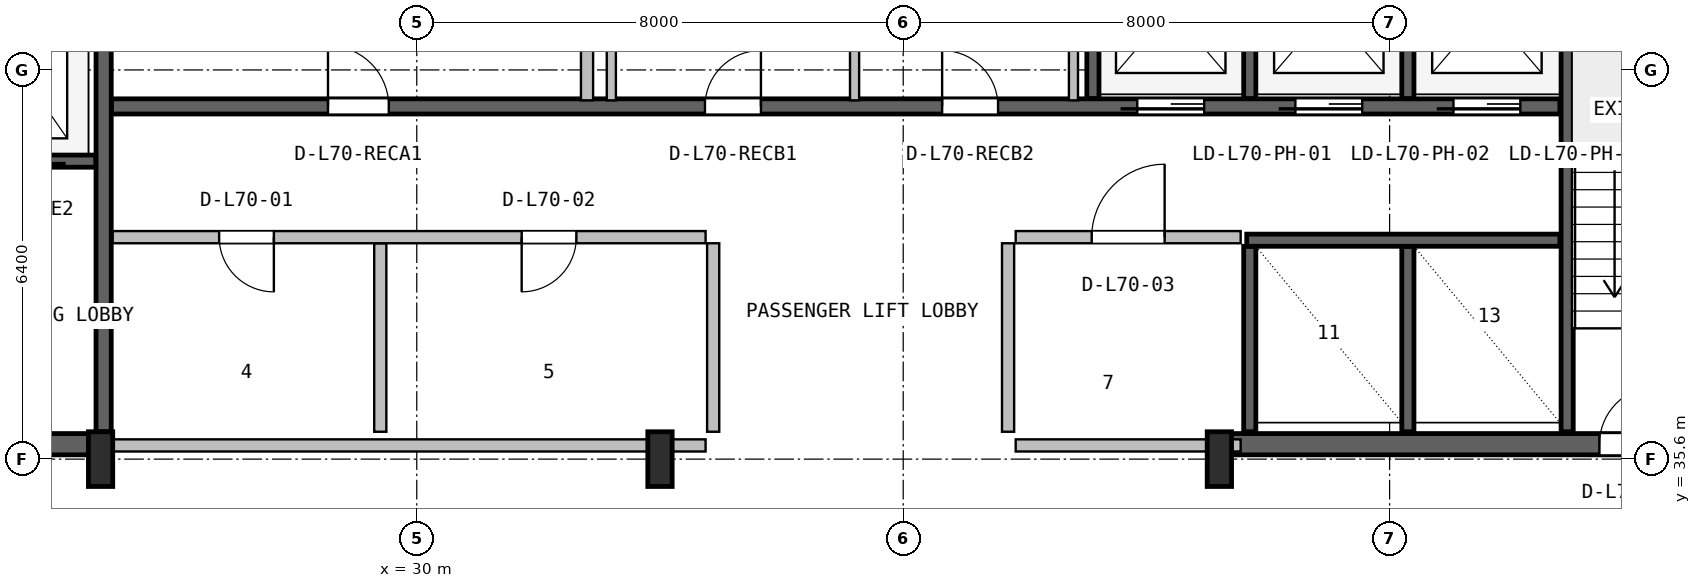
"""IFC4 building model, lengths in metres.
Left out: names, types, materials, properties, quantities, classifications, styles, units other than length and angle.
Written with IfcOpenShell. Run it as: python <this file> out.ifc"""

import sys

from ifc_helpers import new_model, si_unit, direction, frame, frame_2d, origin, origin_2d, place, context, subcontext, project, spatial, rectangle, i_section, extrude, source, transform, mapped, element, fill, save


model = new_model("IFC4")
c1 = context("Model", 3, precision=1e-05, world=origin(), true_north=direction((0.0, 1.0)))
c2 = subcontext(c1, "Body", "Model", "MODEL_VIEW")
j1 = project(units=[si_unit("LENGTHUNIT", "METRE"), si_unit("PLANEANGLEUNIT", "RADIAN")], contexts=[c1])
p1 = place(None, origin())
s1 = spatial("IfcSite", under=j1, at=p1, CompositionType="ELEMENT")
p2 = place(p1, origin())
s2 = spatial("IfcBuilding", under=s1, at=p2, CompositionType="ELEMENT")
p3 = place(p2, frame((0.0, 0.0, 281.2)))
s3 = spatial("IfcBuildingStorey", under=s2, at=p3, CompositionType="ELEMENT", Elevation=281.2)
p4 = place(p3, frame((15.67, 35.845, 0.0), z_axis=(0.0, 0.0, 1.0), x_axis=(1.0, 0.0, 0.0)))
e1 = element("IfcWall", 1, at=p4, inside=s3, PredefinedType="SHEAR", context=c2, shape_type="SweptSolid", body=[
    extrude(rectangle(XDim=9.13, YDim=0.35, at=frame_2d((4.565, 0.0))), origin(), (0.0, 0.0, 1.0), 3.55),
])
p5 = place(p4, frame((5.4, 0.0, 0.0)))
e2 = element("IfcOpeningElement", 2, at=p5, cuts=e1, PredefinedType="OPENING", context=c2, shape_type="SweptSolid", body=[
    extrude(rectangle(XDim=1.0, YDim=2.1, at=frame_2d((0.5, 1.05))), frame((0.0, 0.185, 0.0), z_axis=(0.0, -1.0, 0.0), x_axis=(1.0, 0.0, 0.0)), (0.0, 0.0, 1.0), 0.37),
])
p6 = place(p3, frame((43.2, 35.845, 0.0), z_axis=(0.0, 0.0, 1.0), x_axis=(1.0, 0.0, 0.0)))
e3 = element("IfcWall", 3, at=p6, inside=s3, PredefinedType="SHEAR", context=c2, shape_type="SweptSolid", body=[
    extrude(rectangle(XDim=9.13, YDim=0.35, at=frame_2d((4.565, 0.0))), origin(), (0.0, 0.0, 1.0), 3.55),
])
p7 = place(p6, frame((6.25, 0.0, 0.0)))
e4 = element("IfcOpeningElement", 4, at=p7, cuts=e3, PredefinedType="OPENING", context=c2, shape_type="SweptSolid", body=[
    extrude(rectangle(XDim=0.95, YDim=2.1, at=frame_2d((0.475, 1.05))), frame((0.0, 0.185, 0.0), z_axis=(0.0, -1.0, 0.0), x_axis=(1.0, 0.0, 0.0)), (0.0, 0.0, 1.0), 0.37),
])
m1 = source(origin(), c2, "Body", "SweptSolid", [
    extrude(i_section(OverallWidth=0.4, OverallDepth=0.9, WebThickness=0.016, FlangeThickness=0.028, FilletRadius=0.016, at=origin_2d()), origin(), (0.0, 0.0, 1.0), 3.8),
])
for number, where, z_axis, x_axis in (
    (5, (24.8, 35.6, 0.0), (0.0, 0.0, 1.0), (1.0, 0.0, 0.0)),
    (6, (34.0, 35.6, 0.0), (0.0, 0.0, 1.0), (1.0, 0.0, 0.0)),
    (7, (43.2, 35.6, 0.0), (0.0, 0.0, 1.0), (1.0, 0.0, 0.0)),
):
    element("IfcColumn", number, at=place(p3, frame(where, z_axis=z_axis, x_axis=x_axis)), inside=s3, PredefinedType="COLUMN", context=c2, shape_type="MappedRepresentation", body=[
        mapped(m1, transform((0.0, 0.0, 0.0), x_axis=(1.0, 0.0, 0.0), y_axis=(0.0, 1.0, 0.0), z_axis=(0.0, 0.0, 1.0), scale=1.0)),
    ])
p8 = place(p3, frame((24.85, 36.05, 0.0), z_axis=(0.0, 0.0, 1.0), x_axis=(0.0, 1.0, 0.0)))
e8 = element("IfcWall", 8, at=p8, inside=s3, PredefinedType="SHEAR", context=c2, shape_type="SweptSolid", body=[
    extrude(rectangle(XDim=10.45, YDim=0.25, at=frame_2d((5.225, 0.0))), origin(), (0.0, 0.0, 1.0), 3.55),
])
p9 = place(p3, frame((19.2, 40.5, 0.0), z_axis=(0.0, 0.0, 1.0), x_axis=(1.0, 0.0, 0.0)))
e9 = element("IfcWall", 9, at=p9, inside=s3, PredefinedType="SHEAR", context=c2, shape_type="SweptSolid", body=[
    extrude(rectangle(XDim=5.52, YDim=0.2, at=frame_2d((2.76, 0.0))), origin(), (0.0, 0.0, 1.0), 3.55),
])
p10 = place(p9, frame((1.05, 0.0, 0.0)))
e10 = element("IfcOpeningElement", 10, at=p10, cuts=e9, PredefinedType="OPENING", context=c2, shape_type="SweptSolid", body=[
    extrude(rectangle(XDim=1.1, YDim=2.18, at=frame_2d((0.55, 1.09))), frame((0.0, 0.11, 0.0), z_axis=(0.0, -1.0, 0.0), x_axis=(1.0, 0.0, 0.0)), (0.0, 0.0, 1.0), 0.22),
])
p11 = place(p9, frame((3.65, 0.0, 0.0)))
e11 = element("IfcOpeningElement", 11, at=p11, cuts=e9, PredefinedType="OPENING", context=c2, shape_type="SweptSolid", body=[
    extrude(rectangle(XDim=1.1, YDim=2.18, at=frame_2d((0.55, 1.09))), frame((0.0, 0.11, 0.0), z_axis=(0.0, -1.0, 0.0), x_axis=(1.0, 0.0, 0.0)), (0.0, 0.0, 1.0), 0.22),
])
p12 = place(p3, frame((48.92, 36.05, 0.0), z_axis=(0.0, 0.0, 1.0), x_axis=(0.0, 1.0, 0.0)))
e12 = element("IfcWall", 12, at=p12, inside=s3, PredefinedType="SHEAR", context=c2, shape_type="SweptSolid", body=[
    extrude(rectangle(XDim=10.5, YDim=0.2, at=frame_2d((5.25, 0.0))), origin(), (0.0, 0.0, 1.0), 3.55),
])
p13 = place(p3, frame((24.98, 41.4, 0.0), z_axis=(0.0, 0.0, 1.0), x_axis=(1.0, 0.0, 0.0)))
e13 = element("IfcWall", 13, at=p13, inside=s3, PredefinedType="SHEAR", context=c2, shape_type="SweptSolid", body=[
    extrude(rectangle(XDim=23.82, YDim=0.25, at=frame_2d((11.91, 0.0))), origin(), (0.0, 0.0, 1.0), 3.55),
])
p14 = place(p13, frame((16.87, 0.0, 0.0)))
e14 = element("IfcOpeningElement", 14, at=p14, cuts=e13, PredefinedType="OPENING", context=c2, shape_type="SweptSolid", body=[
    extrude(rectangle(XDim=1.1, YDim=2.18, at=frame_2d((0.55, 1.09))), frame((0.0, 0.135, 0.0), z_axis=(0.0, -1.0, 0.0), x_axis=(1.0, 0.0, 0.0)), (0.0, 0.0, 1.0), 0.27),
])
p15 = place(p13, frame((19.47, 0.0, 0.0)))
e15 = element("IfcOpeningElement", 15, at=p15, cuts=e13, PredefinedType="OPENING", context=c2, shape_type="SweptSolid", body=[
    extrude(rectangle(XDim=1.1, YDim=2.18, at=frame_2d((0.55, 1.09))), frame((0.0, 0.135, 0.0), z_axis=(0.0, -1.0, 0.0), x_axis=(1.0, 0.0, 0.0)), (0.0, 0.0, 1.0), 0.27),
])
p16 = place(p13, frame((22.07, 0.0, 0.0)))
e16 = element("IfcOpeningElement", 16, at=p16, cuts=e13, PredefinedType="OPENING", context=c2, shape_type="SweptSolid", body=[
    extrude(rectangle(XDim=1.1, YDim=2.18, at=frame_2d((0.55, 1.09))), frame((0.0, 0.135, 0.0), z_axis=(0.0, -1.0, 0.0), x_axis=(1.0, 0.0, 0.0)), (0.0, 0.0, 1.0), 0.27),
])
p17 = place(p13, frame((3.56, 0.0, 0.0)))
e17 = element("IfcOpeningElement", 17, at=p17, cuts=e13, PredefinedType="OPENING", context=c2, shape_type="SweptSolid", body=[
    extrude(rectangle(XDim=1.0, YDim=2.08, at=frame_2d((0.5, 1.04))), frame((0.0, 0.135, 0.0), z_axis=(0.0, -1.0, 0.0), x_axis=(1.0, 0.0, 0.0)), (0.0, 0.0, 1.0), 0.27),
])
p18 = place(p13, frame((9.76, 0.0, 0.0)))
e18 = element("IfcOpeningElement", 18, at=p18, cuts=e13, PredefinedType="OPENING", context=c2, shape_type="SweptSolid", body=[
    extrude(rectangle(XDim=0.92, YDim=2.08, at=frame_2d((0.46, 1.04))), frame((0.0, 0.135, 0.0), z_axis=(0.0, -1.0, 0.0), x_axis=(1.0, 0.0, 0.0)), (0.0, 0.0, 1.0), 0.27),
])
p19 = place(p13, frame((13.66, 0.0, 0.0)))
e19 = element("IfcOpeningElement", 19, at=p19, cuts=e13, PredefinedType="OPENING", context=c2, shape_type="SweptSolid", body=[
    extrude(rectangle(XDim=0.92, YDim=2.08, at=frame_2d((0.46, 1.04))), frame((0.0, 0.135, 0.0), z_axis=(0.0, -1.0, 0.0), x_axis=(1.0, 0.0, 0.0)), (0.0, 0.0, 1.0), 0.27),
])
p20 = place(p3, frame((41.12, 41.53, 0.0), z_axis=(0.0, 0.0, 1.0), x_axis=(0.0, 1.0, 0.0)))
e20 = element("IfcWall", 20, at=p20, inside=s3, PredefinedType="SHEAR", context=c2, shape_type="SweptSolid", body=[
    extrude(rectangle(XDim=5.02, YDim=0.2, at=frame_2d((2.51, 0.0))), origin(), (0.0, 0.0, 1.0), 3.55),
])
for number, where, z_axis, x_axis in (
    (21, (43.7, 41.53, 0.0), (0.0, 0.0, 1.0), (0.0, 1.0, 0.0)),
    (22, (46.3, 41.53, 0.0), (0.0, 0.0, 1.0), (0.0, 1.0, 0.0)),
):
    element("IfcWall", number, at=place(p3, frame(where, z_axis=z_axis, x_axis=x_axis)), inside=s3, PredefinedType="SHEAR", context=c2, shape_type="SweptSolid", body=[
        extrude(rectangle(XDim=2.87, YDim=0.2, at=frame_2d((1.435, 0.0))), origin(), (0.0, 0.0, 1.0), 3.55),
    ])
for number, where, z_axis, x_axis in (
    (23, (43.7, 36.05, 0.0), (0.0, 0.0, 1.0), (0.0, 1.0, 0.0)),
    (24, (46.3, 36.05, 0.0), (0.0, 0.0, 1.0), (0.0, 1.0, 0.0)),
):
    element("IfcWall", number, at=place(p3, frame(where, z_axis=z_axis, x_axis=x_axis)), inside=s3, PredefinedType="SHEAR", context=c2, shape_type="SweptSolid", body=[
        extrude(rectangle(XDim=3.05, YDim=0.2, at=frame_2d((1.525, 0.0))), origin(), (0.0, 0.0, 1.0), 3.55),
    ])
p21 = place(p3, frame((43.65, 39.2, 0.0), z_axis=(0.0, 0.0, 1.0), x_axis=(1.0, 0.0, 0.0)))
e25 = element("IfcWall", 25, at=p21, inside=s3, PredefinedType="SHEAR", context=c2, shape_type="SweptSolid", body=[
    extrude(rectangle(XDim=5.15, YDim=0.2, at=frame_2d((2.575, 0.0))), origin(), (0.0, 0.0, 1.0), 3.55),
])
p22 = place(p3, frame((25.0, 35.825, 0.0), z_axis=(0.0, 0.0, 1.0), x_axis=(1.0, 0.0, 0.0)))
e26 = element("IfcWall", 26, at=p22, inside=s3, PredefinedType="PLUMBINGWALL", context=c2, shape_type="SweptSolid", body=[
    extrude(rectangle(XDim=9.75, YDim=0.2, at=frame_2d((4.875, 0.0))), origin(), (0.0, 0.0, 1.0), 2.575),
])
p23 = place(p3, frame((29.4, 36.05, 0.0), z_axis=(0.0, 0.0, 1.0), x_axis=(0.0, 1.0, 0.0)))
e27 = element("IfcWall", 27, at=p23, inside=s3, PredefinedType="PLUMBINGWALL", context=c2, shape_type="SweptSolid", body=[
    extrude(rectangle(XDim=3.1, YDim=0.2, at=frame_2d((1.55, 0.0))), origin(), (0.0, 0.0, 1.0), 3.53),
])
p24 = place(p3, frame((25.0, 39.25, 0.0), z_axis=(0.0, 0.0, 1.0), x_axis=(1.0, 0.0, 0.0)))
e28 = element("IfcWall", 28, at=p24, inside=s3, PredefinedType="PLUMBINGWALL", context=c2, shape_type="SweptSolid", body=[
    extrude(rectangle(XDim=9.75, YDim=0.2, at=frame_2d((4.875, 0.0))), origin(), (0.0, 0.0, 1.0), 3.53),
])
p25 = place(p24, frame((1.75, 0.0, 0.0)))
e29 = element("IfcOpeningElement", 29, at=p25, cuts=e28, PredefinedType="OPENING", context=c2, shape_type="SweptSolid", body=[
    extrude(rectangle(XDim=0.9, YDim=2.06, at=frame_2d((0.45, 1.03))), frame((0.0, 0.11, 0.0), z_axis=(0.0, -1.0, 0.0), x_axis=(1.0, 0.0, 0.0)), (0.0, 0.0, 1.0), 0.22),
])
p26 = place(p24, frame((6.725, 0.0, 0.0)))
e30 = element("IfcOpeningElement", 30, at=p26, cuts=e28, PredefinedType="OPENING", context=c2, shape_type="SweptSolid", body=[
    extrude(rectangle(XDim=0.9, YDim=2.06, at=frame_2d((0.45, 1.03))), frame((0.0, 0.11, 0.0), z_axis=(0.0, -1.0, 0.0), x_axis=(1.0, 0.0, 0.0)), (0.0, 0.0, 1.0), 0.22),
])
p27 = place(p3, frame((34.875, 36.05, 0.0), z_axis=(0.0, 0.0, 1.0), x_axis=(0.0, 1.0, 0.0)))
e31 = element("IfcWall", 31, at=p27, inside=s3, PredefinedType="PLUMBINGWALL", context=c2, shape_type="SweptSolid", body=[
    extrude(rectangle(XDim=3.1, YDim=0.2, at=frame_2d((1.55, 0.0))), origin(), (0.0, 0.0, 1.0), 3.53),
])
p28 = place(p3, frame((39.85, 35.825, 0.0), z_axis=(0.0, 0.0, 1.0), x_axis=(1.0, 0.0, 0.0)))
e32 = element("IfcWall", 32, at=p28, inside=s3, PredefinedType="SOLIDWALL", context=c2, shape_type="SweptSolid", body=[
    extrude(rectangle(XDim=3.7, YDim=0.2, at=frame_2d((1.85, 0.0))), origin(), (0.0, 0.0, 1.0), 2.575),
])
p29 = place(p3, frame((39.85, 39.25, 0.0), z_axis=(0.0, 0.0, 1.0), x_axis=(1.0, 0.0, 0.0)))
e33 = element("IfcWall", 33, at=p29, inside=s3, PredefinedType="SOLIDWALL", context=c2, shape_type="SweptSolid", body=[
    extrude(rectangle(XDim=3.7, YDim=0.2, at=frame_2d((1.85, 0.0))), origin(), (0.0, 0.0, 1.0), 3.53),
])
p30 = place(p29, frame((1.25, 0.0, 0.0)))
e34 = element("IfcOpeningElement", 34, at=p30, cuts=e33, PredefinedType="OPENING", context=c2, shape_type="SweptSolid", body=[
    extrude(rectangle(XDim=1.2, YDim=2.1, at=frame_2d((0.6, 1.05))), frame((0.0, 0.11, 0.0), z_axis=(0.0, -1.0, 0.0), x_axis=(1.0, 0.0, 0.0)), (0.0, 0.0, 1.0), 0.22),
])
p31 = place(p3, frame((39.725, 36.05, 0.0), z_axis=(0.0, 0.0, 1.0), x_axis=(0.0, 1.0, 0.0)))
e35 = element("IfcWall", 35, at=p31, inside=s3, PredefinedType="SOLIDWALL", context=c2, shape_type="SweptSolid", body=[
    extrude(rectangle(XDim=3.1, YDim=0.2, at=frame_2d((1.55, 0.0))), origin(), (0.0, 0.0, 1.0), 3.53),
])
p32 = place(p3, frame((32.8, 41.5, 0.0), z_axis=(0.0, 0.0, 1.0), x_axis=(0.0, 1.0, 0.0)))
e36 = element("IfcWall", 36, at=p32, inside=s3, PredefinedType="SOLIDWALL", context=c2, shape_type="SweptSolid", body=[
    extrude(rectangle(XDim=5.02, YDim=0.2, at=frame_2d((2.51, 0.0))), origin(), (0.0, 0.0, 1.0), 3.53),
])
p33 = place(p3, frame((37.2, 41.5, 0.0), z_axis=(0.0, 0.0, 1.0), x_axis=(0.0, 1.0, 0.0)))
e37 = element("IfcWall", 37, at=p33, inside=s3, PredefinedType="PARTITIONING", context=c2, shape_type="SweptSolid", body=[
    extrude(rectangle(XDim=2.325, YDim=0.15, at=frame_2d((1.163, 0.0))), origin(), (0.0, 0.0, 1.0), 3.53),
])
for number, where, z_axis, x_axis in (
    (38, (40.8, 41.5, 0.0), (0.0, 0.0, 1.0), (0.0, 1.0, 0.0)),
    (39, (33.2, 41.5, 0.0), (0.0, 0.0, 1.0), (0.0, 1.0, 0.0)),
):
    element("IfcWall", number, at=place(p3, frame(where, z_axis=z_axis, x_axis=x_axis)), inside=s3, PredefinedType="PARTITIONING", context=c2, shape_type="SweptSolid", body=[
        extrude(rectangle(XDim=5.02, YDim=0.15, at=frame_2d((2.51, 0.0))), origin(), (0.0, 0.0, 1.0), 3.53),
    ])
m2 = source(origin(), c2, "Body", "SweptSolid", [
    extrude(rectangle(XDim=0.95, YDim=2.1, at=frame_2d((0.475, 1.05))), frame((0.0, 0.025, 0.0), z_axis=(0.0, -1.0, 0.0), x_axis=(1.0, 0.0, 0.0)), (0.0, 0.0, 1.0), 0.05),
])
p34 = place(p7, origin())
e40 = element("IfcDoor", 40, at=p34, inside=s3, OperationType="SINGLE_SWING_RIGHT", PredefinedType="DOOR", context=c2, shape_type="MappedRepresentation", body=[
    mapped(m2, transform((0.0, 0.0, 0.0), x_axis=(1.0, 0.0, 0.0), y_axis=(0.0, 1.0, 0.0), z_axis=(0.0, 0.0, 1.0), scale=1.0)),
])
fill(e4, e40)
m3 = source(origin(), c2, "Body", "SweptSolid", [
    extrude(rectangle(XDim=1.1, YDim=2.18, at=frame_2d((0.55, 1.09))), frame((0.0, 0.025, 0.0), z_axis=(0.0, -1.0, 0.0), x_axis=(1.0, 0.0, 0.0)), (0.0, 0.0, 1.0), 0.05),
])
p35 = place(p14, frame((1.1, 0.0, 0.0), z_axis=(0.0, 0.0, 1.0), x_axis=(-1.0, 0.0, 0.0)))
e41 = element("IfcDoor", 41, at=p35, inside=s3, OperationType="SLIDING_TO_LEFT", PredefinedType="DOOR", context=c2, shape_type="MappedRepresentation", body=[
    mapped(m3, transform((0.0, 0.0, 0.0), x_axis=(1.0, 0.0, 0.0), y_axis=(0.0, 1.0, 0.0), z_axis=(0.0, 0.0, 1.0), scale=1.0)),
])
fill(e14, e41)
p36 = place(p15, frame((1.1, 0.0, 0.0), z_axis=(0.0, 0.0, 1.0), x_axis=(-1.0, 0.0, 0.0)))
e42 = element("IfcDoor", 42, at=p36, inside=s3, OperationType="SLIDING_TO_LEFT", PredefinedType="DOOR", context=c2, shape_type="MappedRepresentation", body=[
    mapped(m3, transform((0.0, 0.0, 0.0), x_axis=(1.0, 0.0, 0.0), y_axis=(0.0, 1.0, 0.0), z_axis=(0.0, 0.0, 1.0), scale=1.0)),
])
fill(e15, e42)
p37 = place(p16, frame((1.1, 0.0, 0.0), z_axis=(0.0, 0.0, 1.0), x_axis=(-1.0, 0.0, 0.0)))
e43 = element("IfcDoor", 43, at=p37, inside=s3, OperationType="SLIDING_TO_LEFT", PredefinedType="DOOR", context=c2, shape_type="MappedRepresentation", body=[
    mapped(m3, transform((0.0, 0.0, 0.0), x_axis=(1.0, 0.0, 0.0), y_axis=(0.0, 1.0, 0.0), z_axis=(0.0, 0.0, 1.0), scale=1.0)),
])
fill(e16, e43)
m4 = source(origin(), c2, "Body", "SweptSolid", [
    extrude(rectangle(XDim=1.0, YDim=2.08, at=frame_2d((0.5, 1.04))), frame((0.0, 0.025, 0.0), z_axis=(0.0, -1.0, 0.0), x_axis=(1.0, 0.0, 0.0)), (0.0, 0.0, 1.0), 0.05),
])
p38 = place(p17, origin())
e44 = element("IfcDoor", 44, at=p38, inside=s3, OperationType="SINGLE_SWING_LEFT", PredefinedType="DOOR", context=c2, shape_type="MappedRepresentation", body=[
    mapped(m4, transform((0.0, 0.0, 0.0), x_axis=(1.0, 0.0, 0.0), y_axis=(0.0, 1.0, 0.0), z_axis=(0.0, 0.0, 1.0), scale=1.0)),
])
fill(e17, e44)
m5 = source(origin(), c2, "Body", "SweptSolid", [
    extrude(rectangle(XDim=0.92, YDim=2.08, at=frame_2d((0.46, 1.04))), frame((0.0, 0.025, 0.0), z_axis=(0.0, -1.0, 0.0), x_axis=(1.0, 0.0, 0.0)), (0.0, 0.0, 1.0), 0.05),
])
p39 = place(p18, origin())
e45 = element("IfcDoor", 45, at=p39, inside=s3, OperationType="SINGLE_SWING_RIGHT", PredefinedType="DOOR", context=c2, shape_type="MappedRepresentation", body=[
    mapped(m5, transform((0.0, 0.0, 0.0), x_axis=(1.0, 0.0, 0.0), y_axis=(0.0, 1.0, 0.0), z_axis=(0.0, 0.0, 1.0), scale=1.0)),
])
fill(e18, e45)
p40 = place(p19, origin())
e46 = element("IfcDoor", 46, at=p40, inside=s3, OperationType="SINGLE_SWING_LEFT", PredefinedType="DOOR", context=c2, shape_type="MappedRepresentation", body=[
    mapped(m5, transform((0.0, 0.0, 0.0), x_axis=(1.0, 0.0, 0.0), y_axis=(0.0, 1.0, 0.0), z_axis=(0.0, 0.0, 1.0), scale=1.0)),
])
fill(e19, e46)
m6 = source(origin(), c2, "Body", "SweptSolid", [
    extrude(rectangle(XDim=0.9, YDim=2.06, at=frame_2d((0.45, 1.03))), frame((0.0, 0.025, 0.0), z_axis=(0.0, -1.0, 0.0), x_axis=(1.0, 0.0, 0.0)), (0.0, 0.0, 1.0), 0.05),
])
p41 = place(p25, frame((0.9, 0.0, 0.0), z_axis=(0.0, 0.0, 1.0), x_axis=(-1.0, 0.0, 0.0)))
e47 = element("IfcDoor", 47, at=p41, inside=s3, OperationType="SINGLE_SWING_RIGHT", PredefinedType="DOOR", context=c2, shape_type="MappedRepresentation", body=[
    mapped(m6, transform((0.0, 0.0, 0.0), x_axis=(1.0, 0.0, 0.0), y_axis=(0.0, 1.0, 0.0), z_axis=(0.0, 0.0, 1.0), scale=1.0)),
])
fill(e29, e47)
p42 = place(p26, frame((0.9, 0.0, 0.0), z_axis=(0.0, 0.0, 1.0), x_axis=(-1.0, 0.0, 0.0)))
e48 = element("IfcDoor", 48, at=p42, inside=s3, OperationType="SINGLE_SWING_LEFT", PredefinedType="DOOR", context=c2, shape_type="MappedRepresentation", body=[
    mapped(m6, transform((0.0, 0.0, 0.0), x_axis=(1.0, 0.0, 0.0), y_axis=(0.0, 1.0, 0.0), z_axis=(0.0, 0.0, 1.0), scale=1.0)),
])
fill(e30, e48)
m7 = source(origin(), c2, "Body", "SweptSolid", [
    extrude(rectangle(XDim=1.2, YDim=2.1, at=frame_2d((0.6, 1.05))), frame((0.0, 0.025, 0.0), z_axis=(0.0, -1.0, 0.0), x_axis=(1.0, 0.0, 0.0)), (0.0, 0.0, 1.0), 0.05),
])
p43 = place(p30, origin())
e49 = element("IfcDoor", 49, at=p43, inside=s3, OperationType="SINGLE_SWING_RIGHT", PredefinedType="DOOR", context=c2, shape_type="MappedRepresentation", body=[
    mapped(m7, transform((0.0, 0.0, 0.0), x_axis=(1.0, 0.0, 0.0), y_axis=(0.0, 1.0, 0.0), z_axis=(0.0, 0.0, 1.0), scale=1.0)),
])
fill(e34, e49)
save(model, sys.argv[1])
